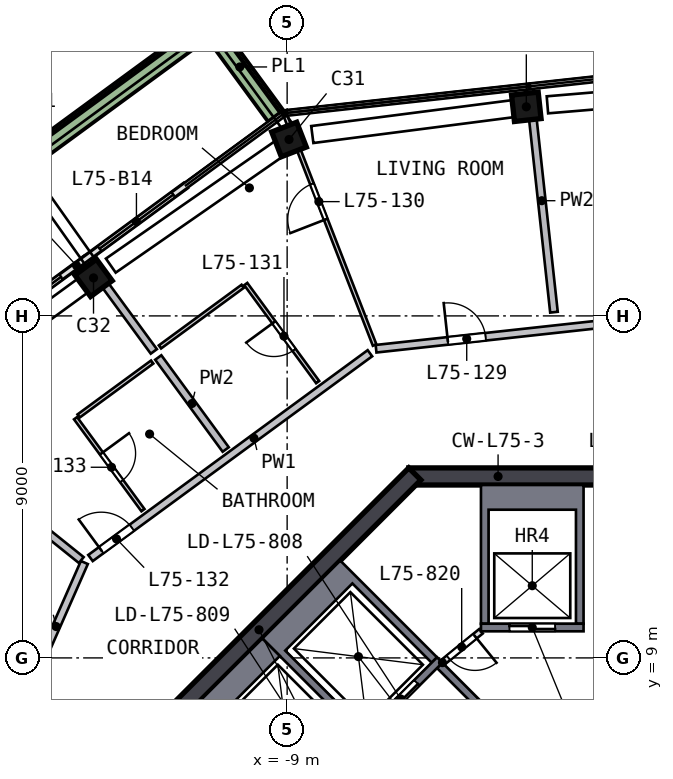
"""IFC4 building model, lengths in metres.
Left out: names, types, materials, properties, quantities, classifications, styles, units other than length and angle.
Written with IfcOpenShell. Run it as: python <this file> out.ifc"""

import sys

from ifc_helpers import new_model, si_unit, direction, frame, frame_2d, origin, origin_2d, place, context, subcontext, project, spatial, polyline, rectangle, outline, extrude, element, fill, save


model = new_model("IFC4")
c1 = context("Model", 3, precision=1e-05, world=origin(), true_north=direction((0.0, 1.0)))
c2 = subcontext(c1, "Body", "Model", "MODEL_VIEW")
j1 = project(units=[si_unit("LENGTHUNIT", "METRE"), si_unit("PLANEANGLEUNIT", "RADIAN")], contexts=[c1])
p1 = place(None, origin())
s1 = spatial("IfcSite", under=j1, at=p1, CompositionType="ELEMENT")
p2 = place(p1, origin())
s2 = spatial("IfcBuilding", under=s1, at=p2, CompositionType="ELEMENT")
p3 = place(p2, frame((0.0, 0.0, 303.0)))
s3 = spatial("IfcBuildingStorey", under=s2, at=p3, CompositionType="ELEMENT", Elevation=303.0)
p4 = place(p3, frame((-2.572, 23.518, 0.0), z_axis=(-0.111790618, -0.013232359, 0.99364368), x_axis=(-0.987711126, -0.108422299, -0.112567032)))
e1 = element("IfcColumn", 1, at=p4, inside=s3, PredefinedType="COLUMN", context=c2, shape_type="SweptSolid", body=[
    extrude(rectangle(XDim=0.7, YDim=0.7, at=origin_2d()), origin(), (0.0, 0.0, 1.0), 3.21),
])
p5 = place(p3, frame((-8.821, 22.694, 0.0), z_axis=(-0.107492672, -0.042875436, 0.993280938), x_axis=(0.925689354, 0.36014885, 0.115723917)))
e2 = element("IfcColumn", 2, at=p5, inside=s3, PredefinedType="COLUMN", context=c2, shape_type="SweptSolid", body=[
    extrude(rectangle(XDim=0.7, YDim=0.7, at=origin_2d()), origin(), (0.0, 0.0, 1.0), 3.211),
])
p6 = place(p3, frame((-13.986, 19.082, 0.0), z_axis=(-0.090193328, -0.067302778, 0.993647573), x_axis=(-0.801380305, -0.58747426, -0.112532662)))
e3 = element("IfcColumn", 3, at=p6, inside=s3, PredefinedType="COLUMN", context=c2, shape_type="SweptSolid", body=[
    extrude(rectangle(XDim=0.7, YDim=0.7, at=origin_2d()), origin(), (0.0, 0.0, 1.0), 3.21),
])
p7 = place(p3, frame((5.799, 13.775, 0.0), z_axis=(0.0, 0.0, 1.0), x_axis=(-1.0, 0.0, 0.0)))
e4 = element("IfcWall", 4, at=p7, inside=s3, PredefinedType="SHEAR", context=c2, shape_type="SweptSolid", body=[
    extrude(rectangle(XDim=11.598, YDim=0.45, at=frame_2d((5.799, 0.0))), origin(), (0.0, 0.0, 1.0), 3.5),
])
p8 = place(p7, frame((4.899, 0.0, 0.0)))
e5 = element("IfcOpeningElement", 5, at=p8, cuts=e4, PredefinedType="OPENING", context=c2, shape_type="SweptSolid", body=[
    extrude(rectangle(XDim=1.8, YDim=2.1, at=frame_2d((0.9, 1.05))), frame((0.0, 0.235, 0.0), z_axis=(0.0, -1.0, 0.0), x_axis=(1.0, 0.0, 0.0)), (0.0, 0.0, 1.0), 0.47),
])
p9 = place(p3, frame((-5.64, 13.841, 0.0), z_axis=(0.0, 0.0, 1.0), x_axis=(-0.707106781, -0.707106781, 0.0)))
e6 = element("IfcWall", 6, at=p9, inside=s3, PredefinedType="SHEAR", context=c2, shape_type="SweptSolid", body=[
    extrude(rectangle(XDim=11.598, YDim=0.45, at=frame_2d((5.799, 0.0))), origin(), (0.0, 0.0, 1.0), 3.5),
])
p10 = place(p3, frame((-11.675, 21.426, 0.0), z_axis=(0.0, 0.0, 1.0), x_axis=(-0.806576916, -0.591129156, 0.0)))
e7 = element("IfcWall", 7, at=p10, inside=s3, PredefinedType="SOLIDWALL", context=c2, shape_type="SweptSolid", body=[
    extrude(rectangle(XDim=3.25, YDim=0.15, at=frame_2d((1.625, 0.0))), origin(), (0.0, 0.0, 1.0), 2.525),
])
p11 = place(p10, frame((0.4, 0.0, 0.0)))
e8 = element("IfcOpeningElement", 8, at=p11, cuts=e7, PredefinedType="OPENING", context=c2, shape_type="SweptSolid", body=[
    extrude(rectangle(XDim=2.4, YDim=2.4, at=frame_2d((1.2, 1.2))), frame((0.0, 0.085, 0.0), z_axis=(0.0, -1.0, 0.0), x_axis=(1.0, 0.0, 0.0)), (0.0, 0.0, 1.0), 0.17),
])
p12 = place(p3, frame((-14.296, 19.505, 0.0), z_axis=(0.0, 0.0, 1.0), x_axis=(-0.80652319, -0.591202456, 0.0)))
e9 = element("IfcWall", 9, at=p12, inside=s3, PredefinedType="SOLIDWALL", context=c2, shape_type="SweptSolid", body=[
    extrude(rectangle(XDim=3.611, YDim=0.15, at=frame_2d((1.806, 0.0))), origin(), (0.0, 0.0, 1.0), 2.525),
])
p13 = place(p12, frame((0.811, 0.0, 0.0)))
e10 = element("IfcOpeningElement", 10, at=p13, cuts=e9, PredefinedType="OPENING", context=c2, shape_type="SweptSolid", body=[
    extrude(rectangle(XDim=2.4, YDim=2.4, at=frame_2d((1.2, 1.2))), frame((0.0, 0.085, 0.0), z_axis=(0.0, -1.0, 0.0), x_axis=(1.0, 0.0, 0.0)), (0.0, 0.0, 1.0), 0.17),
])
p14 = place(p3, frame((-9.301, 23.261, 0.0), z_axis=(0.0, 0.0, 1.0), x_axis=(-0.591171745, 0.806545701, 0.0)))
e11 = element("IfcWall", 11, at=p14, inside=s3, PredefinedType="SOLIDWALL", context=c2, shape_type="SweptSolid", body=[
    extrude(rectangle(XDim=3.199, YDim=0.5, at=frame_2d((1.6, 0.0))), origin(), (0.0, 0.0, 1.0), 0.7),
])
p15 = place(p3, frame((-11.245, 25.492, 0.0), z_axis=(0.0, 0.0, 1.0), x_axis=(-0.806541226, -0.591177851, 0.0)))
e12 = element("IfcWall", 12, at=p15, inside=s3, PredefinedType="SOLIDWALL", context=c2, shape_type="SweptSolid", body=[
    extrude(rectangle(XDim=10.653, YDim=0.5, at=frame_2d((5.326, 0.0))), origin(), (0.0, 0.0, 1.0), 0.7),
])
p16 = place(p3, origin())
e13 = element("IfcWall", 13, at=p16, inside=s3, PredefinedType="SOLIDWALL", context=c2, shape_type="SweptSolid", body=[
    extrude(outline(polyline([(-3.9, 13.55), (-1.2, 13.55), (-1.2, 9.9), (-1.4, 9.9), (-1.4, 12.9), (-3.7, 12.9), (-3.7, 9.9), (-3.9, 9.9), (-3.9, 13.55)])), origin(), (0.0, 0.0, 1.0), 3.19),
])
p17 = place(p3, frame((-1.2, 9.8, 0.0), z_axis=(0.0, 0.0, 1.0), x_axis=(-1.0, 0.0, 0.0)))
e14 = element("IfcWall", 14, at=p17, inside=s3, PredefinedType="SOLIDWALL", context=c2, shape_type="SweptSolid", body=[
    extrude(rectangle(XDim=2.7, YDim=0.2, at=frame_2d((1.35, 0.0))), origin(), (0.0, 0.0, 1.0), 3.19),
])
p18 = place(p17, frame((0.75, 0.0, 0.0)))
e15 = element("IfcOpeningElement", 15, at=p18, cuts=e14, PredefinedType="OPENING", context=c2, shape_type="SweptSolid", body=[
    extrude(rectangle(XDim=1.2, YDim=2.1, at=frame_2d((0.6, 1.05))), frame((0.0, 0.11, 0.0), z_axis=(0.0, -1.0, 0.0), x_axis=(1.0, 0.0, 0.0)), (0.0, 0.0, 1.0), 0.22),
])
p19 = place(p3, origin())
e16 = element("IfcWall", 16, at=p19, inside=s3, PredefinedType="SOLIDWALL", context=c2, shape_type="SweptSolid", body=[
    extrude(outline(polyline([(-9.652, 9.51), (-7.601, 11.561), (-5.056, 9.016), (-5.197, 8.874), (-7.283, 10.96), (-9.051, 9.192), (-6.965, 7.106), (-7.106, 6.965), (-9.652, 9.51)])), origin(), (0.0, 0.0, 1.0), 3.19),
])
p20 = place(p3, frame((-4.985, 8.945, 0.0), z_axis=(0.0, 0.0, 1.0), x_axis=(-0.707106781, -0.707106781, 0.0)))
e17 = element("IfcWall", 17, at=p20, inside=s3, PredefinedType="SOLIDWALL", context=c2, shape_type="SweptSolid", body=[
    extrude(rectangle(XDim=2.9, YDim=0.2, at=frame_2d((1.45, 0.0))), origin(), (0.0, 0.0, 1.0), 3.19),
])
p21 = place(p20, frame((0.85, 0.0, 0.0)))
e18 = element("IfcOpeningElement", 18, at=p21, cuts=e17, PredefinedType="OPENING", context=c2, shape_type="SweptSolid", body=[
    extrude(rectangle(XDim=1.2, YDim=2.1, at=frame_2d((0.6, 1.05))), frame((0.0, 0.11, 0.0), z_axis=(0.0, -1.0, 0.0), x_axis=(1.0, 0.0, 0.0)), (0.0, 0.0, 1.0), 0.22),
])
p22 = place(p3, origin())
e19 = element("IfcWall", 19, at=p22, inside=s3, PredefinedType="SOLIDWALL", context=c2, shape_type="SweptSolid", body=[
    extrude(outline(polyline([(-11.561, 7.601), (-9.652, 9.51), (-9.192, 9.051), (-10.96, 7.283), (-8.874, 5.197), (-9.016, 5.056), (-11.561, 7.601)])), origin(), (0.0, 0.0, 1.0), 3.19),
])
p23 = place(p3, frame((-3.005, 6.823, 0.0), z_axis=(0.0, 0.0, 1.0), x_axis=(-0.707106781, 0.707106781, 0.0)))
e20 = element("IfcWall", 20, at=p23, inside=s3, PredefinedType="SOLIDWALL", context=c2, shape_type="SweptSolid", body=[
    extrude(rectangle(XDim=2.8, YDim=0.2, at=frame_2d((1.4, 0.0))), origin(), (0.0, 0.0, 1.0), 3.19),
])
p24 = place(p3, frame((-3.9, 9.7, 0.0), z_axis=(0.0, 0.0, 1.0), x_axis=(-0.775559878, -0.631274009, 0.0)))
e21 = element("IfcWall", 21, at=p24, inside=s3, PredefinedType="PARTITIONING", context=c2, shape_type="SweptSolid", body=[
    extrude(rectangle(XDim=1.308, YDim=0.15, at=frame_2d((0.654, 0.0))), origin(), (0.0, 0.0, 1.0), 3.19),
])
p25 = place(p24, frame((0.204, 0.0, 0.0)))
e22 = element("IfcOpeningElement", 22, at=p25, cuts=e21, PredefinedType="OPENING", context=c2, shape_type="SweptSolid", body=[
    extrude(rectangle(XDim=0.9, YDim=2.1, at=frame_2d((0.45, 1.05))), frame((0.0, 0.085, 0.0), z_axis=(0.0, -1.0, 0.0), x_axis=(1.0, 0.0, 0.0)), (0.0, 0.0, 1.0), 0.17),
])
p26 = place(p3, frame((-18.17, 2.8, 0.0), z_axis=(0.0, 0.0, 1.0), x_axis=(0.402913126, 0.915238227, 0.0)))
e23 = element("IfcWall", 23, at=p26, inside=s3, PredefinedType="SOLIDWALL", context=c2, shape_type="SweptSolid", body=[
    extrude(rectangle(XDim=9.517, YDim=0.2, at=frame_2d((4.758, 0.0))), origin(), (0.0, 0.0, 1.0), 3.19),
])
p27 = place(p26, frame((3.835, 0.0, 0.0)))
e24 = element("IfcOpeningElement", 24, at=p27, cuts=e23, PredefinedType="OPENING", context=c2, shape_type="SweptSolid", body=[
    extrude(rectangle(XDim=1.8, YDim=2.1, at=frame_2d((0.9, 1.05))), frame((0.0, 0.11, 0.0), z_axis=(0.0, -1.0, 0.0), x_axis=(1.0, 0.0, 0.0)), (0.0, 0.0, 1.0), 0.22),
])
p28 = place(p3, frame((-14.175, 11.628, 0.0), z_axis=(0.0, 0.0, 1.0), x_axis=(0.806552259, 0.591162797, 0.0)))
e25 = element("IfcWall", 25, at=p28, inside=s3, PredefinedType="SOLIDWALL", context=c2, shape_type="SweptSolid", body=[
    extrude(rectangle(XDim=9.117, YDim=0.2, at=frame_2d((4.558, 0.0))), origin(), (0.0, 0.0, 1.0), 3.19),
])
p29 = place(p28, frame((0.35, 0.0, 0.0)))
e26 = element("IfcOpeningElement", 26, at=p29, cuts=e25, PredefinedType="OPENING", context=c2, shape_type="SweptSolid", body=[
    extrude(rectangle(XDim=1.0, YDim=2.1, at=frame_2d((0.5, 1.05))), frame((0.0, 0.11, 0.0), z_axis=(0.0, -1.0, 0.0), x_axis=(1.0, 0.0, 0.0)), (0.0, 0.0, 1.0), 0.22),
])
p30 = place(p3, frame((-6.66, 17.136, 0.0), z_axis=(0.0, 0.0, 1.0), x_axis=(0.994077134, 0.108676822, 0.0)))
e27 = element("IfcWall", 27, at=p30, inside=s3, PredefinedType="SOLIDWALL", context=c2, shape_type="SweptSolid", body=[
    extrude(rectangle(XDim=9.316, YDim=0.2, at=frame_2d((4.658, 0.0))), origin(), (0.0, 0.0, 1.0), 3.19),
])
p31 = place(p30, frame((1.9, 0.0, 0.0)))
e28 = element("IfcOpeningElement", 28, at=p31, cuts=e27, PredefinedType="OPENING", context=c2, shape_type="SweptSolid", body=[
    extrude(rectangle(XDim=1.0, YDim=2.1, at=frame_2d((0.5, 1.05))), frame((0.0, 0.11, 0.0), z_axis=(0.0, -1.0, 0.0), x_axis=(1.0, 0.0, 0.0)), (0.0, 0.0, 1.0), 0.22),
])
p32 = place(p3, frame((-19.466, 15.629, 0.0), z_axis=(0.0, 0.0, 1.0), x_axis=(0.779771517, -0.626064199, 0.0)))
e29 = element("IfcWall", 29, at=p32, inside=s3, PredefinedType="SOLIDWALL", context=c2, shape_type="SweptSolid", body=[
    extrude(rectangle(XDim=6.476, YDim=0.2, at=frame_2d((3.238, 0.0))), origin(), (0.0, 0.0, 1.0), 3.19),
])
p33 = place(p3, frame((-12.508, 17.065, 0.0), z_axis=(0.0, 0.0, 1.0), x_axis=(-0.59119862, 0.806526002, 0.0)))
e30 = element("IfcWall", 30, at=p33, inside=s3, PredefinedType="SOLIDWALL", context=c2, shape_type="SweptSolid", body=[
    extrude(rectangle(XDim=2.95, YDim=0.2, at=frame_2d((1.475, 0.0))), origin(), (0.0, 0.0, 1.0), 3.19),
])
p34 = place(p3, frame((-10.616, 14.484, 0.0), z_axis=(0.0, 0.0, 1.0), x_axis=(-0.591180306, 0.806539426, 0.0)))
e31 = element("IfcWall", 31, at=p34, inside=s3, PredefinedType="SOLIDWALL", context=c2, shape_type="SweptSolid", body=[
    extrude(rectangle(XDim=3.002, YDim=0.2, at=frame_2d((1.501, 0.0))), origin(), (0.0, 0.0, 1.0), 3.19),
])
p35 = place(p3, frame((-1.979, 18.098, 0.0), z_axis=(0.0, 0.0, 1.0), x_axis=(-0.108697214, 0.994074904, 0.0)))
e32 = element("IfcWall", 32, at=p35, inside=s3, PredefinedType="SOLIDWALL", context=c2, shape_type="SweptSolid", body=[
    extrude(rectangle(XDim=5.903, YDim=0.2, at=frame_2d((2.951, 0.0))), origin(), (0.0, 0.0, 1.0), 3.19),
])
p36 = place(p3, frame((-14.568, 15.308, 0.0), z_axis=(0.0, 0.0, 1.0), x_axis=(0.591187235, -0.806534347, 0.0)))
e33 = element("IfcWall", 33, at=p36, inside=s3, PredefinedType="PARTITIONING", context=c2, shape_type="SweptSolid", body=[
    extrude(rectangle(XDim=3.0, YDim=0.1, at=frame_2d((1.5, 0.0))), origin(), (0.0, 0.0, 1.0), 3.19),
])
p37 = place(p36, frame((1.15, 0.0, 0.0)))
e34 = element("IfcOpeningElement", 34, at=p37, cuts=e33, PredefinedType="OPENING", context=c2, shape_type="SweptSolid", body=[
    extrude(rectangle(XDim=0.9, YDim=2.1, at=frame_2d((0.45, 1.05))), frame((0.0, 0.06, 0.0), z_axis=(0.0, -1.0, 0.0), x_axis=(1.0, 0.0, 0.0)), (0.0, 0.0, 1.0), 0.12),
])
p38 = place(p3, frame((-14.487, 15.367, 0.0), z_axis=(0.0, 0.0, 1.0), x_axis=(0.806544049, 0.591173999, 0.0)))
e35 = element("IfcWall", 35, at=p38, inside=s3, PredefinedType="PARTITIONING", context=c2, shape_type="SweptSolid", body=[
    extrude(rectangle(XDim=2.4, YDim=0.1, at=frame_2d((1.2, 0.0))), origin(), (0.0, 0.0, 1.0), 3.19),
])
p39 = place(p3, frame((-10.169, 18.78, 0.0), z_axis=(0.0, 0.0, 1.0), x_axis=(-0.8065171, -0.591210764, 0.0)))
e36 = element("IfcWall", 36, at=p39, inside=s3, PredefinedType="PARTITIONING", context=c2, shape_type="SweptSolid", body=[
    extrude(rectangle(XDim=2.7, YDim=0.1, at=frame_2d((1.35, 0.0))), origin(), (0.0, 0.0, 1.0), 3.19),
])
p40 = place(p3, frame((-8.197, 16.258, 0.0), z_axis=(0.0, 0.0, 1.0), x_axis=(-0.591161873, 0.806552937, 0.0)))
e37 = element("IfcWall", 37, at=p40, inside=s3, PredefinedType="PARTITIONING", context=c2, shape_type="SweptSolid", body=[
    extrude(rectangle(XDim=3.2, YDim=0.1, at=frame_2d((1.6, 0.0))), origin(), (0.0, 0.0, 1.0), 3.19),
])
p41 = place(p40, frame((1.05, 0.0, 0.0)))
e38 = element("IfcOpeningElement", 38, at=p41, cuts=e37, PredefinedType="OPENING", context=c2, shape_type="SweptSolid", body=[
    extrude(rectangle(XDim=0.9, YDim=2.1, at=frame_2d((0.45, 1.05))), frame((0.0, 0.06, 0.0), z_axis=(0.0, -1.0, 0.0), x_axis=(1.0, 0.0, 0.0)), (0.0, 0.0, 1.0), 0.12),
])
p42 = place(p3, frame((-6.698, 17.232, 0.0), z_axis=(0.0, 0.0, 1.0), x_axis=(-0.36226614, 0.932074699, 0.0)))
e39 = element("IfcWall", 39, at=p42, inside=s3, PredefinedType="PARTITIONING", context=c2, shape_type="SweptSolid", body=[
    extrude(rectangle(XDim=6.476, YDim=0.1, at=frame_2d((3.238, 0.0))), origin(), (0.0, 0.0, 1.0), 3.19),
])
p43 = place(p42, frame((3.55, 0.0, 0.0)))
e40 = element("IfcOpeningElement", 40, at=p43, cuts=e39, PredefinedType="OPENING", context=c2, shape_type="SweptSolid", body=[
    extrude(rectangle(XDim=1.0, YDim=2.1, at=frame_2d((0.5, 1.05))), frame((0.0, 0.06, 0.0), z_axis=(0.0, -1.0, 0.0), x_axis=(1.0, 0.0, 0.0)), (0.0, 0.0, 1.0), 0.12),
])
p44 = place(p11, origin())
e41 = element("IfcDoor", 41, at=p44, inside=s3, OperationType="SLIDING_TO_RIGHT", PredefinedType="DOOR", context=c2, shape_type="SweptSolid", body=[
    extrude(rectangle(XDim=2.4, YDim=2.4, at=frame_2d((1.2, 1.2))), frame((0.0, 0.025, 0.0), z_axis=(0.0, -1.0, 0.0), x_axis=(1.0, 0.0, 0.0)), (0.0, 0.0, 1.0), 0.05),
])
fill(e8, e41)
p45 = place(p13, origin())
e42 = element("IfcDoor", 42, at=p45, inside=s3, OperationType="SLIDING_TO_LEFT", PredefinedType="DOOR", context=c2, shape_type="SweptSolid", body=[
    extrude(rectangle(XDim=2.4, YDim=2.4, at=frame_2d((1.2, 1.2))), frame((0.0, 0.025, 0.0), z_axis=(0.0, -1.0, 0.0), x_axis=(1.0, 0.0, 0.0)), (0.0, 0.0, 1.0), 0.05),
])
fill(e10, e42)
p46 = place(p18, origin())
e43 = element("IfcDoor", 43, at=p46, inside=s3, OperationType="DOUBLE_DOOR_SLIDING", PredefinedType="DOOR", context=c2, shape_type="SweptSolid", body=[
    extrude(rectangle(XDim=1.2, YDim=2.1, at=frame_2d((0.6, 1.05))), frame((0.0, 0.025, 0.0), z_axis=(0.0, -1.0, 0.0), x_axis=(1.0, 0.0, 0.0)), (0.0, 0.0, 1.0), 0.05),
])
fill(e15, e43)
p47 = place(p21, origin())
e44 = element("IfcDoor", 44, at=p47, inside=s3, OperationType="DOUBLE_DOOR_SLIDING", PredefinedType="DOOR", context=c2, shape_type="SweptSolid", body=[
    extrude(rectangle(XDim=1.2, YDim=2.1, at=frame_2d((0.6, 1.05))), frame((0.0, 0.025, 0.0), z_axis=(0.0, -1.0, 0.0), x_axis=(1.0, 0.0, 0.0)), (0.0, 0.0, 1.0), 0.05),
])
fill(e18, e44)
p48 = place(p25, origin())
e45 = element("IfcDoor", 45, at=p48, inside=s3, OperationType="SINGLE_SWING_LEFT", PredefinedType="DOOR", context=c2, shape_type="SweptSolid", body=[
    extrude(rectangle(XDim=0.9, YDim=2.1, at=frame_2d((0.45, 1.05))), frame((0.0, 0.025, 0.0), z_axis=(0.0, -1.0, 0.0), x_axis=(1.0, 0.0, 0.0)), (0.0, 0.0, 1.0), 0.05),
])
fill(e22, e45)
p49 = place(p31, origin())
e46 = element("IfcDoor", 46, at=p49, inside=s3, OperationType="SINGLE_SWING_LEFT", PredefinedType="DOOR", context=c2, shape_type="SweptSolid", body=[
    extrude(rectangle(XDim=1.0, YDim=2.1, at=frame_2d((0.5, 1.05))), frame((0.0, 0.025, 0.0), z_axis=(0.0, -1.0, 0.0), x_axis=(1.0, 0.0, 0.0)), (0.0, 0.0, 1.0), 0.05),
])
fill(e28, e46)
p50 = place(p43, origin())
e47 = element("IfcDoor", 47, at=p50, inside=s3, OperationType="SINGLE_SWING_LEFT", PredefinedType="DOOR", context=c2, shape_type="SweptSolid", body=[
    extrude(rectangle(XDim=1.0, YDim=2.1, at=frame_2d((0.5, 1.05))), frame((0.0, 0.025, 0.0), z_axis=(0.0, -1.0, 0.0), x_axis=(1.0, 0.0, 0.0)), (0.0, 0.0, 1.0), 0.05),
])
fill(e40, e47)
p51 = place(p41, origin())
e48 = element("IfcDoor", 48, at=p51, inside=s3, OperationType="SINGLE_SWING_RIGHT", PredefinedType="DOOR", context=c2, shape_type="SweptSolid", body=[
    extrude(rectangle(XDim=0.9, YDim=2.1, at=frame_2d((0.45, 1.05))), frame((0.0, 0.025, 0.0), z_axis=(0.0, -1.0, 0.0), x_axis=(1.0, 0.0, 0.0)), (0.0, 0.0, 1.0), 0.05),
])
fill(e38, e48)
p52 = place(p29, origin())
e49 = element("IfcDoor", 49, at=p52, inside=s3, OperationType="SINGLE_SWING_LEFT", PredefinedType="DOOR", context=c2, shape_type="SweptSolid", body=[
    extrude(rectangle(XDim=1.0, YDim=2.1, at=frame_2d((0.5, 1.05))), frame((0.0, 0.025, 0.0), z_axis=(0.0, -1.0, 0.0), x_axis=(1.0, 0.0, 0.0)), (0.0, 0.0, 1.0), 0.05),
])
fill(e26, e49)
p53 = place(p37, origin())
e50 = element("IfcDoor", 50, at=p53, inside=s3, OperationType="SINGLE_SWING_LEFT", PredefinedType="DOOR", context=c2, shape_type="SweptSolid", body=[
    extrude(rectangle(XDim=0.9, YDim=2.1, at=frame_2d((0.45, 1.05))), frame((0.0, 0.025, 0.0), z_axis=(0.0, -1.0, 0.0), x_axis=(1.0, 0.0, 0.0)), (0.0, 0.0, 1.0), 0.05),
])
fill(e34, e50)
save(model, sys.argv[1])
